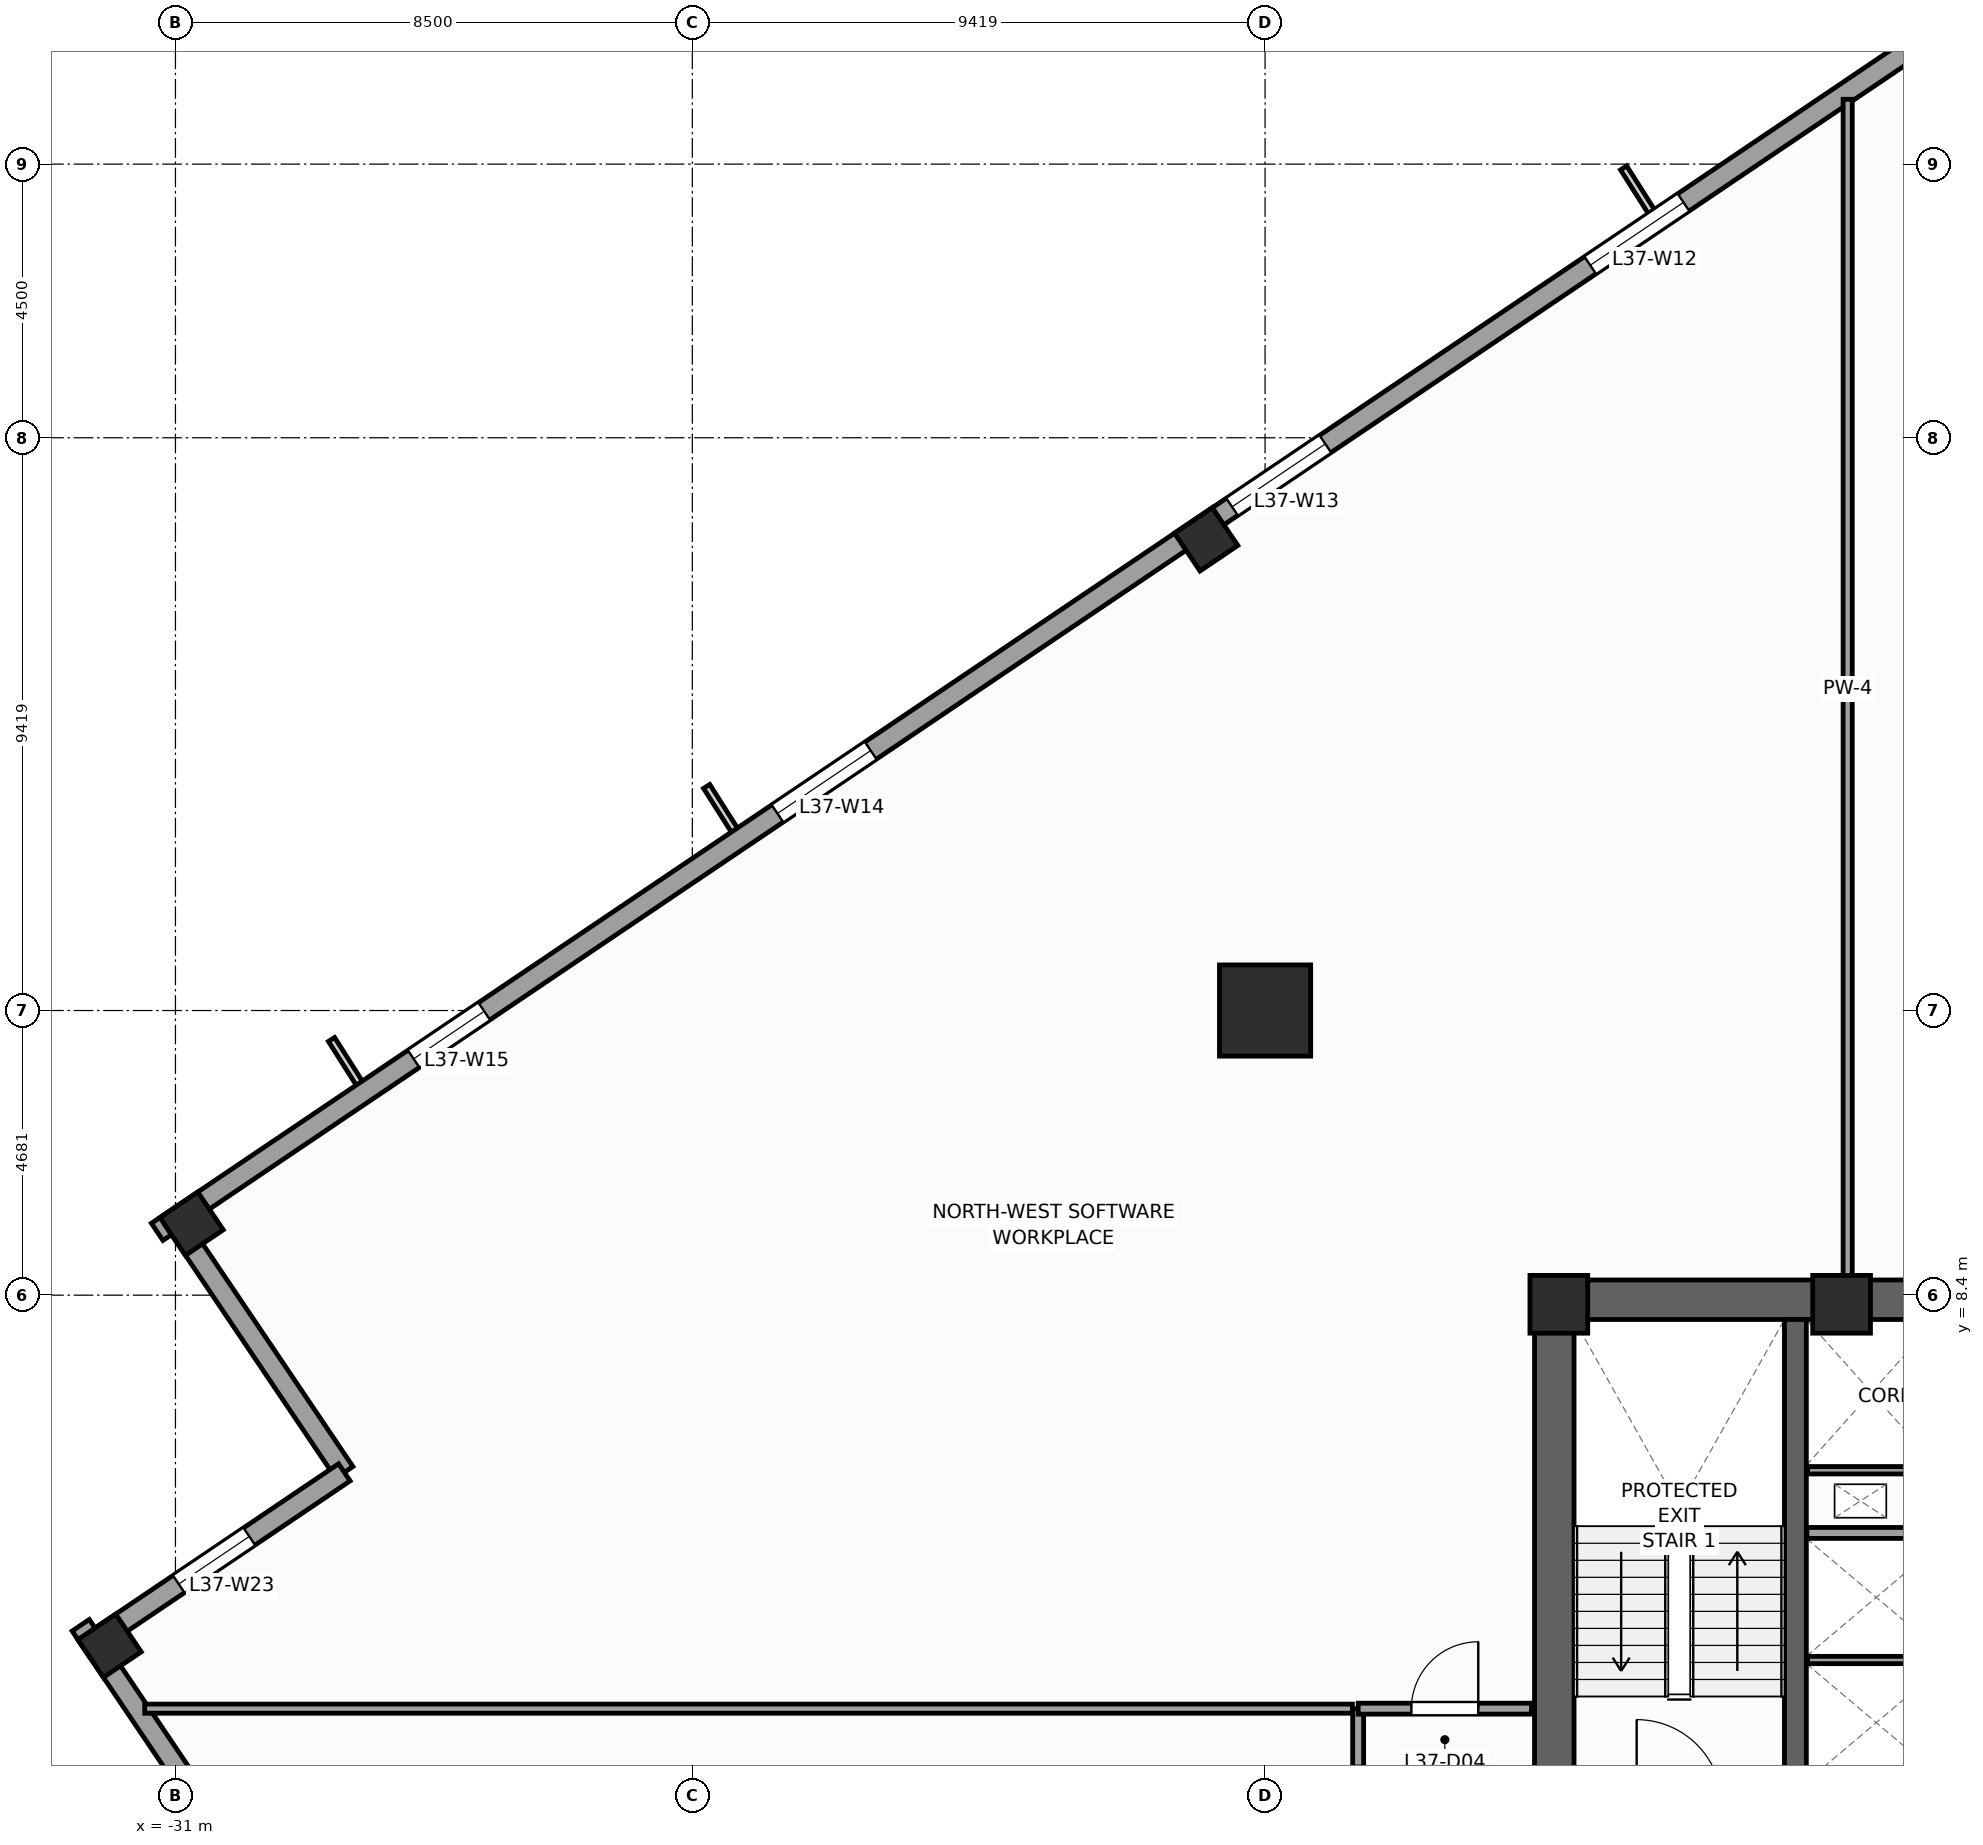
"""IFC4 building model, lengths in metres.
Left out: names, types, materials, properties, quantities, classifications, styles, units other than length and angle.
Written with IfcOpenShell. Run it as: python <this file> out.ifc"""

import sys

from ifc_helpers import new_model, si_unit, direction, frame, frame_2d, origin, origin_2d, place, context, subcontext, project, spatial, rectangle, extrude, source, transform, mapped, element, fill, save


model = new_model("IFC4")
c1 = context("Model", 3, precision=1e-05, world=origin(), true_north=direction((0.0, 1.0)))
c2 = subcontext(c1, "Body", "Model", "MODEL_VIEW")
j1 = project(units=[si_unit("LENGTHUNIT", "METRE"), si_unit("PLANEANGLEUNIT", "RADIAN")], contexts=[c1])
p1 = place(None, origin())
s1 = spatial("IfcSite", under=j1, at=p1, CompositionType="ELEMENT")
p2 = place(p1, origin())
s2 = spatial("IfcBuilding", under=s1, at=p2, CompositionType="ELEMENT")
p3 = place(p2, frame((0.0, 0.0, 156.4)))
s3 = spatial("IfcBuildingStorey", under=s2, at=p3, CompositionType="ELEMENT", Elevation=156.4)
p4 = place(p3, frame((-8.65, 8.325, 0.0), z_axis=(0.0, 0.0, 1.0), x_axis=(1.0, 0.0, 0.0)))
e1 = element("IfcWall", 1, at=p4, inside=s3, PredefinedType="SHEAR", context=c2, shape_type="SweptSolid", body=[
    extrude(rectangle(XDim=17.3, YDim=0.65, at=frame_2d((8.65, 0.0))), origin(), (0.0, 0.0, 1.0), 4.0),
])
p5 = place(p3, frame((-8.325, -8.0, 0.0), z_axis=(0.0, 0.0, 1.0), x_axis=(0.0, 1.0, 0.0)))
e2 = element("IfcWall", 2, at=p5, inside=s3, PredefinedType="SHEAR", context=c2, shape_type="SweptSolid", body=[
    extrude(rectangle(XDim=16.0, YDim=0.65, at=frame_2d((8.0, 0.0))), origin(), (0.0, 0.0, 1.0), 4.0),
])
p6 = place(p5, frame((4.69, 0.0, 0.0)))
e3 = element("IfcOpeningElement", 3, at=p6, cuts=e2, PredefinedType="OPENING", context=c2, shape_type="SweptSolid", body=[
    extrude(rectangle(XDim=1.3, YDim=2.2, at=frame_2d((0.65, 1.1))), frame((0.0, 0.335, 0.0), z_axis=(0.0, -1.0, 0.0), x_axis=(1.0, 0.0, 0.0)), (0.0, 0.0, 1.0), 0.67),
])
p7 = place(p3, frame((-4.36, -8.0, 0.0), z_axis=(0.0, 0.0, 1.0), x_axis=(0.0, 1.0, 0.0)))
e4 = element("IfcWall", 4, at=p7, inside=s3, PredefinedType="SHEAR", context=c2, shape_type="SweptSolid", body=[
    extrude(rectangle(XDim=16.0, YDim=0.36, at=frame_2d((8.0, 0.0))), origin(), (0.0, 0.0, 1.0), 4.0),
])
m1 = source(origin(), c2, "Body", "SweptSolid", [
    extrude(rectangle(XDim=0.95, YDim=0.95, at=origin_2d()), origin(), (0.0, 0.0, 1.0), 4.0),
])
for number, where, z_axis, x_axis in (
    (5, (-8.25, 8.25, 0.0), (0.0, 0.0, 1.0), (1.0, 0.0, 0.0)),
    (6, (-3.6, 8.25, 0.0), (0.0, 0.0, 1.0), (1.0, 0.0, 0.0)),
):
    element("IfcColumn", number, at=place(p3, frame(where, z_axis=z_axis, x_axis=x_axis)), inside=s3, PredefinedType="PILASTER", context=c2, shape_type="MappedRepresentation", body=[
        mapped(m1, transform((0.0, 0.0, 0.0), scale=1.0)),
    ])
m2 = source(origin(), c2, "Body", "SweptSolid", [
    extrude(rectangle(XDim=1.5, YDim=1.5, at=origin_2d()), origin(), (0.0, 0.0, 1.0), 4.0),
])
p8 = place(p3, frame((-13.081, 13.081, 0.0), z_axis=(0.0, 0.0, 1.0), x_axis=(1.0, 0.0, 0.0)))
e7 = element("IfcColumn", 7, at=p8, inside=s3, PredefinedType="COLUMN", context=c2, shape_type="MappedRepresentation", body=[
    mapped(m2, transform((0.0, 0.0, 0.0), scale=1.0)),
])
m3 = source(origin(), c2, "Body", "SweptSolid", [
    extrude(rectangle(XDim=0.75, YDim=0.75, at=origin_2d()), origin(), (0.0, 0.0, 1.0), 4.0),
])
for number, where, z_axis, x_axis in (
    (8, (-14.05, 20.83, 0.0), (0.0, 0.0, 1.0), (0.829, 0.559, 0.0)),
    (9, (-30.734, 9.576, 0.0), (0.0, 0.0, 1.0), (0.829, 0.559, 0.0)),
    (10, (-32.083, 2.635, 0.0), (0.0, 0.0, 1.0), (0.829, 0.559, 0.0)),
):
    element("IfcColumn", number, at=place(p3, frame(where, z_axis=z_axis, x_axis=x_axis)), inside=s3, PredefinedType="COLUMN", context=c2, shape_type="MappedRepresentation", body=[
        mapped(m3, transform((0.0, 0.0, 0.0), scale=1.0)),
    ])
p9 = place(p3, frame((2.972, 32.558, 0.0), z_axis=(0.0, 0.0, 1.0), x_axis=(-0.829036218961, -0.559194910251, 0.0)))
e11 = element("IfcWall", 11, at=p9, inside=s3, PredefinedType="STANDARD", context=c2, shape_type="SweptSolid", body=[
    extrude(rectangle(XDim=41.34, YDim=0.34, at=frame_2d((20.67, 0.0))), origin(), (0.0, 0.0, 1.0), 3.04),
])
p10 = place(p9, frame((4.261, 0.0, 0.56)))
e12 = element("IfcOpeningElement", 12, at=p10, cuts=e11, PredefinedType="OPENING", context=c2, shape_type="SweptSolid", body=[
    extrude(rectangle(XDim=1.4, YDim=2.4, at=frame_2d((0.7, 1.2))), frame((0.0, 0.18, 0.0), z_axis=(0.0, -1.0, 0.0), x_axis=(1.0, 0.0, 0.0)), (0.0, 0.0, 1.0), 0.36),
])
p11 = place(p9, frame((11.064, 0.0, 0.61)))
e13 = element("IfcOpeningElement", 13, at=p11, cuts=e11, PredefinedType="OPENING", context=c2, shape_type="SweptSolid", body=[
    extrude(rectangle(XDim=1.85, YDim=2.35, at=frame_2d((0.925, 1.175))), frame((0.0, 0.18, 0.0), z_axis=(0.0, -1.0, 0.0), x_axis=(1.0, 0.0, 0.0)), (0.0, 0.0, 1.0), 0.36),
])
p12 = place(p9, frame((18.168, 0.0, 0.61)))
e14 = element("IfcOpeningElement", 14, at=p12, cuts=e11, PredefinedType="OPENING", context=c2, shape_type="SweptSolid", body=[
    extrude(rectangle(XDim=1.85, YDim=2.35, at=frame_2d((0.925, 1.175))), frame((0.0, 0.18, 0.0), z_axis=(0.0, -1.0, 0.0), x_axis=(1.0, 0.0, 0.0)), (0.0, 0.0, 1.0), 0.36),
])
p13 = place(p9, frame((27.186, 0.0, 0.61)))
e15 = element("IfcOpeningElement", 15, at=p13, cuts=e11, PredefinedType="OPENING", context=c2, shape_type="SweptSolid", body=[
    extrude(rectangle(XDim=1.85, YDim=2.35, at=frame_2d((0.925, 1.175))), frame((0.0, 0.18, 0.0), z_axis=(0.0, -1.0, 0.0), x_axis=(1.0, 0.0, 0.0)), (0.0, 0.0, 1.0), 0.36),
])
p14 = place(p9, frame((34.852, 0.0, 0.56)))
e16 = element("IfcOpeningElement", 16, at=p14, cuts=e11, PredefinedType="OPENING", context=c2, shape_type="SweptSolid", body=[
    extrude(rectangle(XDim=1.4, YDim=2.4, at=frame_2d((0.7, 1.2))), frame((0.0, 0.18, 0.0), z_axis=(0.0, -1.0, 0.0), x_axis=(1.0, 0.0, 0.0)), (0.0, 0.0, 1.0), 0.36),
])
p15 = place(p3, frame((-31.019, 9.631, 0.0), z_axis=(0.0, 0.0, 1.0), x_axis=(0.559210350234, -0.829025804298, 0.0)))
e17 = element("IfcWall", 17, at=p15, inside=s3, PredefinedType="STANDARD", context=c2, shape_type="SweptSolid", body=[
    extrude(rectangle(XDim=5.0, YDim=0.34, at=frame_2d((2.5, 0.0))), origin(), (0.0, 0.0, 1.0), 3.74),
])
p16 = place(p3, frame((-28.223, 5.486, 0.0), z_axis=(0.0, 0.0, 1.0), x_axis=(-0.82905227345, -0.559171107879, 0.0)))
e18 = element("IfcWall", 18, at=p16, inside=s3, PredefinedType="STANDARD", context=c2, shape_type="SweptSolid", body=[
    extrude(rectangle(XDim=5.17, YDim=0.34, at=frame_2d((2.585, 0.0))), origin(), (0.0, 0.0, 1.0), 3.04),
])
p17 = place(p16, frame((1.885, 0.0, 0.56)))
e19 = element("IfcOpeningElement", 19, at=p17, cuts=e18, PredefinedType="OPENING", context=c2, shape_type="SweptSolid", body=[
    extrude(rectangle(XDim=1.4, YDim=2.4, at=frame_2d((0.7, 1.2))), frame((0.0, 0.18, 0.0), z_axis=(0.0, -1.0, 0.0), x_axis=(1.0, 0.0, 0.0)), (0.0, 0.0, 1.0), 0.36),
])
p18 = place(p3, frame((-32.558, 2.972, 0.0), z_axis=(0.0, 0.0, 1.0), x_axis=(0.559194910251, -0.829036218961, 0.0)))
e20 = element("IfcWall", 20, at=p18, inside=s3, PredefinedType="STANDARD", context=c2, shape_type="SweptSolid", body=[
    extrude(rectangle(XDim=41.34, YDim=0.34, at=frame_2d((20.67, 0.0))), origin(), (0.0, 0.0, 1.0), 3.04),
])
p19 = place(p18, frame((25.745, 0.0, 0.0)))
e21 = element("IfcOpeningElement", 21, at=p19, cuts=e20, PredefinedType="OPENING", context=c2, shape_type="SweptSolid", body=[
    extrude(rectangle(XDim=1.05, YDim=2.25, at=frame_2d((0.525, 1.125))), frame((0.0, 0.18, 0.0), z_axis=(0.0, -1.0, 0.0), x_axis=(1.0, 0.0, 0.0)), (0.0, 0.0, 1.0), 0.36),
])
p20 = place(p18, frame((5.761, 0.0, 0.56)))
e22 = element("IfcOpeningElement", 22, at=p20, cuts=e20, PredefinedType="OPENING", context=c2, shape_type="SweptSolid", body=[
    extrude(rectangle(XDim=1.4, YDim=2.4, at=frame_2d((0.7, 1.2))), frame((0.0, 0.18, 0.0), z_axis=(0.0, -1.0, 0.0), x_axis=(1.0, 0.0, 0.0)), (0.0, 0.0, 1.0), 0.36),
])
p21 = place(p18, frame((11.064, 0.0, 0.61)))
e23 = element("IfcOpeningElement", 23, at=p21, cuts=e20, PredefinedType="OPENING", context=c2, shape_type="SweptSolid", body=[
    extrude(rectangle(XDim=1.85, YDim=2.35, at=frame_2d((0.925, 1.175))), frame((0.0, 0.18, 0.0), z_axis=(0.0, -1.0, 0.0), x_axis=(1.0, 0.0, 0.0)), (0.0, 0.0, 1.0), 0.36),
])
p22 = place(p18, frame((18.168, 0.0, 0.61)))
e24 = element("IfcOpeningElement", 24, at=p22, cuts=e20, PredefinedType="OPENING", context=c2, shape_type="SweptSolid", body=[
    extrude(rectangle(XDim=1.85, YDim=2.35, at=frame_2d((0.925, 1.175))), frame((0.0, 0.18, 0.0), z_axis=(0.0, -1.0, 0.0), x_axis=(1.0, 0.0, 0.0)), (0.0, 0.0, 1.0), 0.36),
])
p23 = place(p18, frame((27.936, 0.0, 0.61)))
e25 = element("IfcOpeningElement", 25, at=p23, cuts=e20, PredefinedType="OPENING", context=c2, shape_type="SweptSolid", body=[
    extrude(rectangle(XDim=1.85, YDim=2.35, at=frame_2d((0.925, 1.175))), frame((0.0, 0.18, 0.0), z_axis=(0.0, -1.0, 0.0), x_axis=(1.0, 0.0, 0.0)), (0.0, 0.0, 1.0), 0.36),
])
p24 = place(p18, frame((35.602, 0.0, 0.56)))
e26 = element("IfcOpeningElement", 26, at=p24, cuts=e20, PredefinedType="OPENING", context=c2, shape_type="SweptSolid", body=[
    extrude(rectangle(XDim=1.4, YDim=2.4, at=frame_2d((0.7, 1.2))), frame((0.0, 0.18, 0.0), z_axis=(0.0, -1.0, 0.0), x_axis=(1.0, 0.0, 0.0)), (0.0, 0.0, 1.0), 0.36),
])
p25 = place(p3, frame((-4.17, 4.49, 0.0), z_axis=(0.0, 0.0, 1.0), x_axis=(1.0, 0.0, 0.0)))
e27 = element("IfcWall", 27, at=p25, inside=s3, PredefinedType="PARTITIONING", context=c2, shape_type="SweptSolid", body=[
    extrude(rectangle(XDim=2.28, YDim=0.18, at=frame_2d((1.14, 0.0))), origin(), (0.0, 0.0, 1.0), 3.74),
])
p26 = place(p3, frame((-4.16, 2.4, 0.0), z_axis=(0.0, 0.0, 1.0), x_axis=(1.0, 0.0, 0.0)))
e28 = element("IfcWall", 28, at=p26, inside=s3, PredefinedType="PARTITIONING", context=c2, shape_type="SweptSolid", body=[
    extrude(rectangle(XDim=2.26, YDim=0.12, at=frame_2d((1.13, 0.0))), origin(), (0.0, 0.0, 1.0), 3.74),
])
p27 = place(p3, frame((-4.16, 5.52, 0.0), z_axis=(0.0, 0.0, 1.0), x_axis=(1.0, 0.0, 0.0)))
e29 = element("IfcWall", 29, at=p27, inside=s3, PredefinedType="PARTITIONING", context=c2, shape_type="SweptSolid", body=[
    extrude(rectangle(XDim=2.1, YDim=0.12, at=frame_2d((1.05, 0.0))), origin(), (0.0, 0.0, 1.0), 3.74),
])
p28 = place(p3, frame((-11.55, -11.45, 0.0), z_axis=(0.0, 0.0, 1.0), x_axis=(0.0, 1.0, 0.0)))
e30 = element("IfcWall", 30, at=p28, inside=s3, PredefinedType="PARTITIONING", context=c2, shape_type="SweptSolid", body=[
    extrude(rectangle(XDim=13.05, YDim=0.18, at=frame_2d((6.525, 0.0))), origin(), (0.0, 0.0, 1.0), 3.74),
])
p29 = place(p28, frame((4.086, 0.0, 0.0)))
e31 = element("IfcOpeningElement", 31, at=p29, cuts=e30, PredefinedType="OPENING", context=c2, shape_type="SweptSolid", body=[
    extrude(rectangle(XDim=0.95, YDim=2.1, at=frame_2d((0.475, 1.05))), frame((0.0, 0.1, 0.0), z_axis=(0.0, -1.0, 0.0), x_axis=(1.0, 0.0, 0.0)), (0.0, 0.0, 1.0), 0.2),
])
p30 = place(p28, frame((11.01, 0.0, 0.0)))
e32 = element("IfcOpeningElement", 32, at=p30, cuts=e30, PredefinedType="OPENING", context=c2, shape_type="SweptSolid", body=[
    extrude(rectangle(XDim=1.1, YDim=2.2, at=frame_2d((0.55, 1.1))), frame((0.0, 0.1, 0.0), z_axis=(0.0, -1.0, 0.0), x_axis=(1.0, 0.0, 0.0)), (0.0, 0.0, 1.0), 0.2),
])
p31 = place(p28, frame((8.775, 0.0, 0.0)))
e33 = element("IfcOpeningElement", 33, at=p31, cuts=e30, PredefinedType="OPENING", context=c2, shape_type="SweptSolid", body=[
    extrude(rectangle(XDim=1.1, YDim=2.2, at=frame_2d((0.55, 1.1))), frame((0.0, 0.1, 0.0), z_axis=(0.0, -1.0, 0.0), x_axis=(1.0, 0.0, 0.0)), (0.0, 0.0, 1.0), 0.2),
])
p32 = place(p28, frame((6.35, 0.0, 0.0)))
e34 = element("IfcOpeningElement", 34, at=p32, cuts=e30, PredefinedType="OPENING", context=c2, shape_type="SweptSolid", body=[
    extrude(rectangle(XDim=1.1, YDim=2.2, at=frame_2d((0.55, 1.1))), frame((0.0, 0.1, 0.0), z_axis=(0.0, -1.0, 0.0), x_axis=(1.0, 0.0, 0.0)), (0.0, 0.0, 1.0), 0.2),
])
p33 = place(p28, frame((1.24, 0.0, 0.0)))
e35 = element("IfcOpeningElement", 35, at=p33, cuts=e30, PredefinedType="OPENING", context=c2, shape_type="SweptSolid", body=[
    extrude(rectangle(XDim=1.1, YDim=2.2, at=frame_2d((0.55, 1.1))), frame((0.0, 0.1, 0.0), z_axis=(0.0, -1.0, 0.0), x_axis=(1.0, 0.0, 0.0)), (0.0, 0.0, 1.0), 0.2),
])
p34 = place(p3, frame((-11.55, 1.6, 0.0), z_axis=(0.0, 0.0, 1.0), x_axis=(1.0, 0.0, 0.0)))
e36 = element("IfcWall", 36, at=p34, inside=s3, PredefinedType="PARTITIONING", context=c2, shape_type="SweptSolid", body=[
    extrude(rectangle(XDim=2.85, YDim=0.18, at=frame_2d((1.425, 0.0))), origin(), (0.0, 0.0, 1.0), 3.74),
])
p35 = place(p34, frame((0.875, 0.0, 0.0)))
e37 = element("IfcOpeningElement", 37, at=p35, cuts=e36, PredefinedType="OPENING", context=c2, shape_type="SweptSolid", body=[
    extrude(rectangle(XDim=1.1, YDim=2.2, at=frame_2d((0.55, 1.1))), frame((0.0, 0.1, 0.0), z_axis=(0.0, -1.0, 0.0), x_axis=(1.0, 0.0, 0.0)), (0.0, 0.0, 1.0), 0.2),
])
p36 = place(p3, frame((-3.5, 8.655, 0.0), z_axis=(0.0, 0.0, 1.0), x_axis=(0.0, 1.0, 0.0)))
e38 = element("IfcWall", 38, at=p36, inside=s3, PredefinedType="PARTITIONING", context=c2, shape_type="SweptSolid", body=[
    extrude(rectangle(XDim=19.411, YDim=0.15, at=frame_2d((9.706, 0.0))), origin(), (0.0, 0.0, 1.0), 3.74),
])
p37 = place(p3, frame((-31.506, 1.6, 0.0), z_axis=(0.0, 0.0, 1.0), x_axis=(1.0, 0.0, 0.0)))
e39 = element("IfcWall", 39, at=p37, inside=s3, PredefinedType="PARTITIONING", context=c2, shape_type="SweptSolid", body=[
    extrude(rectangle(XDim=19.861, YDim=0.15, at=frame_2d((9.931, 0.0))), origin(), (0.0, 0.0, 1.0), 3.74),
])
m4 = source(origin(), c2, "Body", "SweptSolid", [
    extrude(rectangle(XDim=1.85, YDim=2.35, at=frame_2d((0.925, 1.175))), frame((0.0, 0.03, 0.0), z_axis=(0.0, -1.0, 0.0), x_axis=(1.0, 0.0, 0.0)), (0.0, 0.0, 1.0), 0.06),
])
p38 = place(p11, origin())
e40 = element("IfcWindow", 40, at=p38, inside=s3, PartitioningType="SINGLE_PANEL", PredefinedType="WINDOW", context=c2, shape_type="MappedRepresentation", body=[
    mapped(m4, transform((0.0, 0.0, 0.0), scale=1.0)),
])
fill(e13, e40)
p39 = place(p12, origin())
e41 = element("IfcWindow", 41, at=p39, inside=s3, PartitioningType="SINGLE_PANEL", PredefinedType="WINDOW", context=c2, shape_type="MappedRepresentation", body=[
    mapped(m4, transform((0.0, 0.0, 0.0), scale=1.0)),
])
fill(e14, e41)
p40 = place(p13, origin())
e42 = element("IfcWindow", 42, at=p40, inside=s3, PartitioningType="SINGLE_PANEL", PredefinedType="WINDOW", context=c2, shape_type="MappedRepresentation", body=[
    mapped(m4, transform((0.0, 0.0, 0.0), scale=1.0)),
])
fill(e15, e42)
m5 = source(origin(), c2, "Body", "SweptSolid", [
    extrude(rectangle(XDim=1.4, YDim=2.4, at=frame_2d((0.7, 1.2))), frame((0.0, 0.03, 0.0), z_axis=(0.0, -1.0, 0.0), x_axis=(1.0, 0.0, 0.0)), (0.0, 0.0, 1.0), 0.06),
])
p41 = place(p14, origin())
e43 = element("IfcWindow", 43, at=p41, inside=s3, PartitioningType="SINGLE_PANEL", PredefinedType="WINDOW", context=c2, shape_type="MappedRepresentation", body=[
    mapped(m5, transform((0.0, 0.0, 0.0), scale=1.0)),
])
fill(e16, e43)
p42 = place(p17, origin())
e44 = element("IfcWindow", 44, at=p42, inside=s3, PartitioningType="SINGLE_PANEL", PredefinedType="WINDOW", context=c2, shape_type="MappedRepresentation", body=[
    mapped(m5, transform((0.0, 0.0, 0.0), scale=1.0)),
])
fill(e19, e44)
m6 = source(origin(), c2, "Body", "SweptSolid", [
    extrude(rectangle(XDim=1.1, YDim=2.2, at=frame_2d((0.55, 1.1))), frame((0.0, 0.025, 0.0), z_axis=(0.0, -1.0, 0.0), x_axis=(1.0, 0.0, 0.0)), (0.0, 0.0, 1.0), 0.05),
])
p43 = place(p35, origin())
e45 = element("IfcDoor", 45, at=p43, inside=s3, OperationType="SINGLE_SWING_RIGHT", PredefinedType="DOOR", context=c2, shape_type="MappedRepresentation", body=[
    mapped(m6, transform((0.0, 0.0, 0.0), scale=1.0)),
])
fill(e37, e45)
save(model, sys.argv[1])
